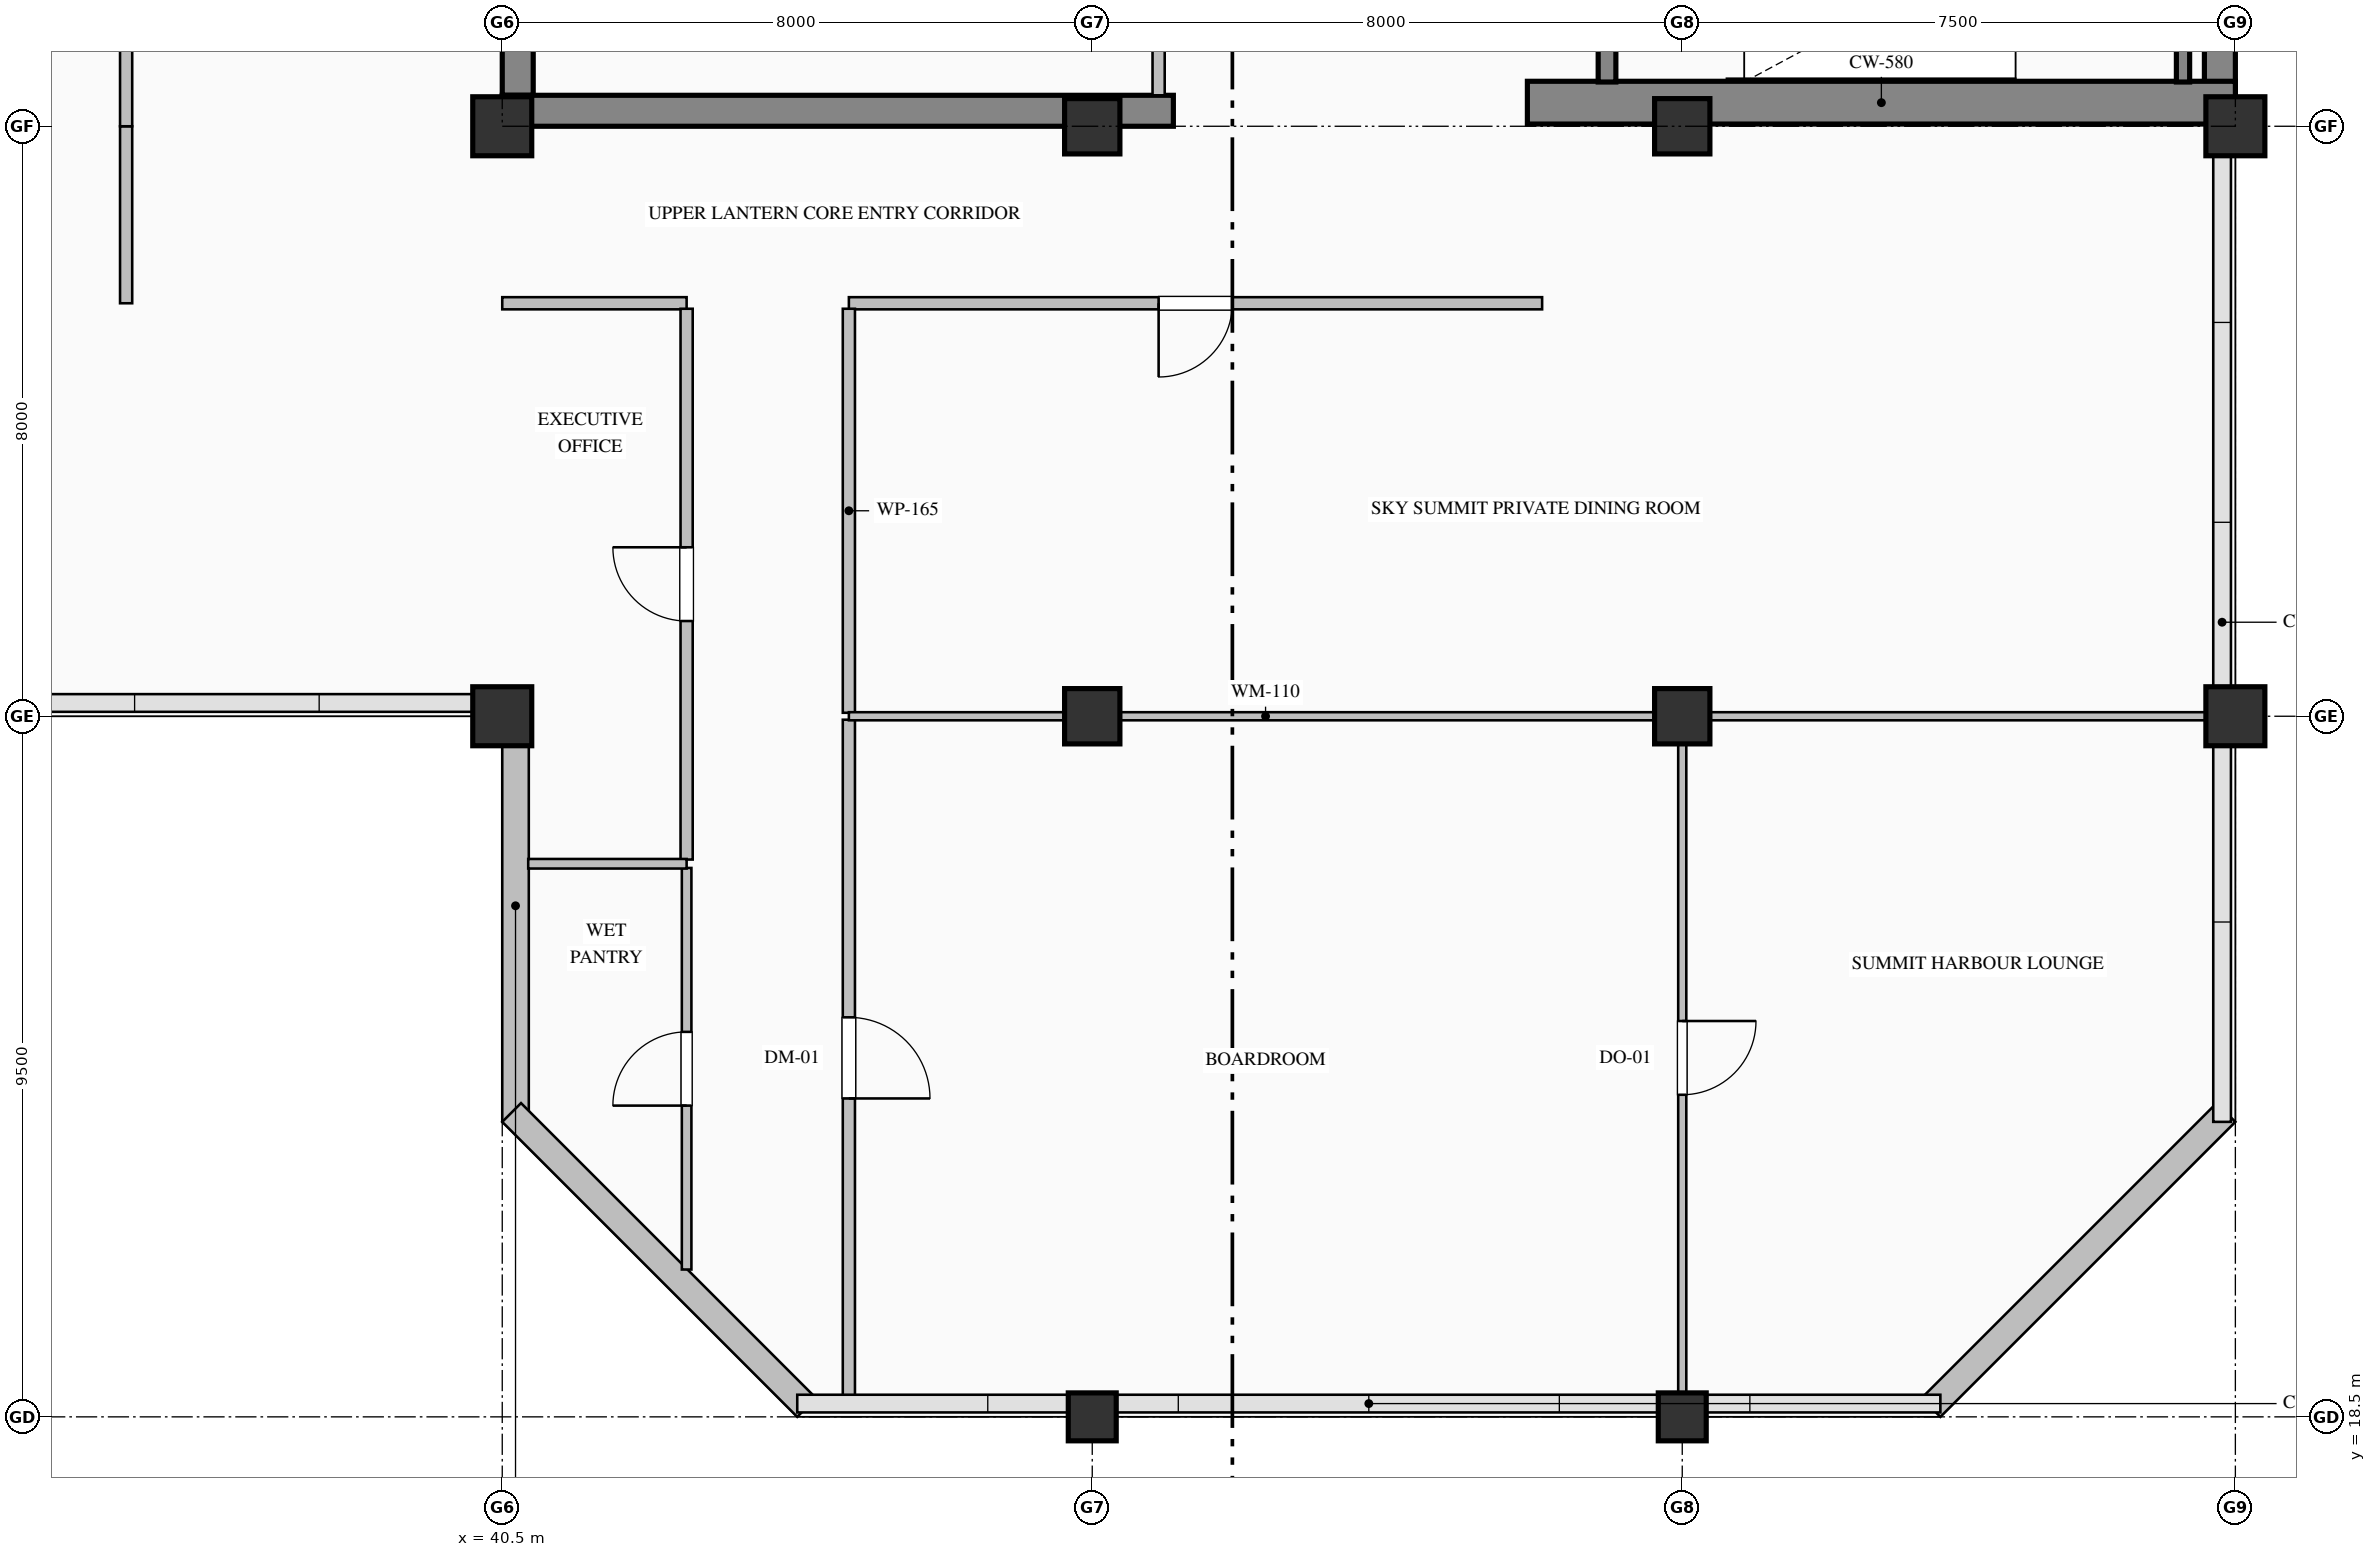
"""IFC4 building model, lengths in metres.
Left out: names, types, materials, properties, quantities, classifications, styles, units other than length and angle.
Written with IfcOpenShell. Run it as: python <this file> out.ifc"""

import sys

from ifc_helpers import new_model, si_unit, direction, frame, frame_2d, origin, origin_2d, place, context, subcontext, project, spatial, rectangle, hollow_rectangle, extrude, element, fill, save


model = new_model("IFC4")
c1 = context("Model", 3, precision=1e-05, world=origin(), true_north=direction((0.0, 1.0)))
c2 = subcontext(c1, "Body", "Model", "MODEL_VIEW")
j1 = project(units=[si_unit("LENGTHUNIT", "METRE"), si_unit("PLANEANGLEUNIT", "RADIAN")], contexts=[c1])
p1 = place(None, origin())
s1 = spatial("IfcSite", under=j1, at=p1, CompositionType="ELEMENT")
p2 = place(p1, origin())
s2 = spatial("IfcBuilding", under=s1, at=p2, CompositionType="ELEMENT")
p3 = place(p2, frame((0.0, 0.0, 378.4)))
s3 = spatial("IfcBuildingStorey", under=s2, at=p3, CompositionType="ELEMENT", Elevation=378.4)
p4 = place(p3, frame((63.79, 36.32, 0.0), z_axis=(0.0, 0.0, 1.0), x_axis=(0.0, 1.0, 0.0)))
e1 = element("IfcWall", 1, at=p4, inside=s3, PredefinedType="SHEAR", context=c2, shape_type="SweptSolid", body=[
    extrude(rectangle(XDim=15.26, YDim=0.42, at=frame_2d((7.63, 0.0))), origin(), (0.0, 0.0, 1.0), 4.95),
])
p5 = place(p3, frame((40.71, 36.42, 0.0), z_axis=(0.0, 0.0, 1.0), x_axis=(0.0, 1.0, 0.0)))
e2 = element("IfcWall", 2, at=p5, inside=s3, PredefinedType="SHEAR", context=c2, shape_type="SweptSolid", body=[
    extrude(rectangle(XDim=7.98, YDim=0.42, at=frame_2d((3.99, 0.0))), origin(), (0.0, 0.0, 1.0), 4.95),
])
p6 = place(p3, frame((40.5, 36.21, 0.0), z_axis=(0.0, 0.0, 1.0), x_axis=(1.0, 0.0, 0.0)))
e3 = element("IfcWall", 3, at=p6, inside=s3, PredefinedType="SHEAR", context=c2, shape_type="SweptSolid", body=[
    extrude(rectangle(XDim=9.1, YDim=0.42, at=frame_2d((4.55, 0.0))), origin(), (0.0, 0.0, 1.0), 4.95),
])
p7 = place(p3, frame((54.4, 36.32, 0.0), z_axis=(0.0, 0.0, 1.0), x_axis=(1.0, 0.0, 0.0)))
e4 = element("IfcWall", 4, at=p7, inside=s3, PredefinedType="SHEAR", context=c2, shape_type="SweptSolid", body=[
    extrude(rectangle(XDim=9.6, YDim=0.58, at=frame_2d((4.8, 0.0))), origin(), (0.0, 0.0, 1.0), 5.4),
])
for number, where, z_axis, x_axis in (
    (5, (40.5, 28.0, 0.0), (0.0, 0.0, 1.0), (1.0, 0.0, 0.0)),
    (6, (40.5, 36.0, 0.0), (0.0, 0.0, 1.0), (1.0, 0.0, 0.0)),
):
    element("IfcColumn", number, at=place(p3, frame(where, z_axis=z_axis, x_axis=x_axis)), inside=s3, PredefinedType="COLUMN", context=c2, shape_type="SweptSolid", body=[
        extrude(hollow_rectangle(XDim=0.8, YDim=0.8, WallThickness=0.032, at=origin_2d()), origin(), (0.0, 0.0, 1.0), 5.4),
    ])
p8 = place(p3, frame((48.5, 18.5, 0.0), z_axis=(0.0, 0.0, 1.0), x_axis=(1.0, 0.0, 0.0)))
e7 = element("IfcColumn", 7, at=p8, inside=s3, PredefinedType="COLUMN", context=c2, shape_type="SweptSolid", body=[
    extrude(hollow_rectangle(XDim=0.65, YDim=0.65, WallThickness=0.028, at=origin_2d()), origin(), (0.0, 0.0, 1.0), 5.4),
])
for number, where, z_axis, x_axis in (
    (8, (48.5, 28.0, 0.0), (0.0, 0.0, 1.0), (1.0, 0.0, 0.0)),
    (9, (48.5, 36.0, 0.0), (0.0, 0.0, 1.0), (1.0, 0.0, 0.0)),
):
    element("IfcColumn", number, at=place(p3, frame(where, z_axis=z_axis, x_axis=x_axis)), inside=s3, PredefinedType="COLUMN", context=c2, shape_type="SweptSolid", body=[
        extrude(rectangle(XDim=0.75, YDim=0.75, at=origin_2d()), origin(), (0.0, 0.0, 1.0), 5.4),
    ])
p9 = place(p3, frame((56.5, 18.5, 0.0), z_axis=(0.0, 0.0, 1.0), x_axis=(1.0, 0.0, 0.0)))
e10 = element("IfcColumn", 10, at=p9, inside=s3, PredefinedType="COLUMN", context=c2, shape_type="SweptSolid", body=[
    extrude(hollow_rectangle(XDim=0.65, YDim=0.65, WallThickness=0.028, at=origin_2d()), origin(), (0.0, 0.0, 1.0), 5.4),
])
for number, where, z_axis, x_axis in (
    (11, (56.5, 28.0, 0.0), (0.0, 0.0, 1.0), (1.0, 0.0, 0.0)),
    (12, (56.5, 36.0, 0.0), (0.0, 0.0, 1.0), (1.0, 0.0, 0.0)),
):
    element("IfcColumn", number, at=place(p3, frame(where, z_axis=z_axis, x_axis=x_axis)), inside=s3, PredefinedType="COLUMN", context=c2, shape_type="SweptSolid", body=[
        extrude(rectangle(XDim=0.75, YDim=0.75, at=origin_2d()), origin(), (0.0, 0.0, 1.0), 5.4),
    ])
for number, where, z_axis, x_axis in (
    (13, (64.0, 28.0, 0.0), (0.0, 0.0, 1.0), (1.0, 0.0, 0.0)),
    (14, (64.0, 36.0, 0.0), (0.0, 0.0, 1.0), (1.0, 0.0, 0.0)),
):
    element("IfcColumn", number, at=place(p3, frame(where, z_axis=z_axis, x_axis=x_axis)), inside=s3, PredefinedType="COLUMN", context=c2, shape_type="SweptSolid", body=[
        extrude(hollow_rectangle(XDim=0.8, YDim=0.8, WallThickness=0.032, at=origin_2d()), origin(), (0.0, 0.0, 1.0), 5.4),
    ])
p10 = place(p3, frame((40.68, 22.5, 0.0), z_axis=(0.0, 0.0, 1.0), x_axis=(0.0, 1.0, 0.0)))
e15 = element("IfcWall", 15, at=p10, inside=s3, PredefinedType="SOLIDWALL", context=c2, shape_type="SweptSolid", body=[
    extrude(rectangle(XDim=5.86, YDim=0.36, at=frame_2d((2.93, 0.0))), origin(), (0.0, 0.0, 1.0), 4.35),
])
for number, where, z_axis, x_axis in (
    (16, (63.873, 22.627, 0.0), (0.0, 0.0, 1.0), (-0.707, -0.707, 0.0)),
    (17, (44.627, 18.627, 0.0), (0.0, 0.0, 1.0), (-0.707, 0.707, 0.0)),
):
    element("IfcWall", number, at=place(p3, frame(where, z_axis=z_axis, x_axis=x_axis)), inside=s3, PredefinedType="SOLIDWALL", context=c2, shape_type="SweptSolid", body=[
        extrude(rectangle(XDim=5.657, YDim=0.36, at=frame_2d((2.828, 0.0))), origin(), (0.0, 0.0, 1.0), 4.95),
    ])
p11 = place(p3, frame((55.48, 39.75, 0.0), z_axis=(0.0, 0.0, 1.0), x_axis=(0.0, -1.0, 0.0)))
e18 = element("IfcWall", 18, at=p11, inside=s3, PredefinedType="SOLIDWALL", context=c2, shape_type="SweptSolid", body=[
    extrude(rectangle(XDim=3.15, YDim=0.24, at=frame_2d((1.575, 0.0))), origin(), (0.0, 0.0, 1.0), 5.4),
])
p12 = place(p11, frame((1.0, 0.0, 0.0)))
e19 = element("IfcOpeningElement", 19, at=p12, cuts=e18, PredefinedType="OPENING", context=c2, shape_type="SweptSolid", body=[
    extrude(rectangle(XDim=1.15, YDim=2.2, at=frame_2d((0.575, 1.1))), frame((0.0, 0.13, 0.0), z_axis=(0.0, -1.0, 0.0), x_axis=(1.0, 0.0, 0.0)), (0.0, 0.0, 1.0), 0.26),
])
p13 = place(p3, frame((63.29, 36.6, 0.0), z_axis=(0.0, 0.0, 1.0), x_axis=(0.0, 1.0, 0.0)))
e20 = element("IfcWall", 20, at=p13, inside=s3, PredefinedType="SOLIDWALL", context=c2, shape_type="SweptSolid", body=[
    extrude(rectangle(XDim=3.15, YDim=0.18, at=frame_2d((1.575, 0.0))), origin(), (0.0, 0.0, 1.0), 5.4),
])
p14 = place(p3, frame((49.4, 36.42, 0.0), z_axis=(0.0, 0.0, 1.0), x_axis=(0.0, 1.0, 0.0)))
e21 = element("IfcWall", 21, at=p14, inside=s3, PredefinedType="PARTITIONING", context=c2, shape_type="SweptSolid", body=[
    extrude(rectangle(XDim=7.73, YDim=0.165, at=frame_2d((3.865, 0.0))), origin(), (0.0, 0.0, 1.0), 4.192),
])
p15 = place(p14, frame((3.365, 0.0, 0.0)))
e22 = element("IfcOpeningElement", 22, at=p15, cuts=e21, PredefinedType="OPENING", context=c2, shape_type="SweptSolid", body=[
    extrude(rectangle(XDim=1.0, YDim=2.15, at=frame_2d((0.5, 1.075))), frame((0.0, 0.093, 0.0), z_axis=(0.0, -1.0, 0.0), x_axis=(1.0, 0.0, 0.0)), (0.0, 0.0, 1.0), 0.185),
])
p16 = place(p3, frame((35.4, 33.6, 0.0), z_axis=(0.0, 0.0, 1.0), x_axis=(0.0, 1.0, 0.0)))
e23 = element("IfcWall", 23, at=p16, inside=s3, PredefinedType="PARTITIONING", context=c2, shape_type="SweptSolid", body=[
    extrude(rectangle(XDim=2.4, YDim=0.165, at=frame_2d((1.2, 0.0))), origin(), (0.0, 0.0, 1.0), 4.95),
])
p17 = place(p3, frame((54.6, 33.6, 0.0), z_axis=(0.0, 0.0, 1.0), x_axis=(-1.0, 0.0, 0.0)))
e24 = element("IfcWall", 24, at=p17, inside=s3, PredefinedType="PARTITIONING", context=c2, shape_type="SweptSolid", body=[
    extrude(rectangle(XDim=9.4, YDim=0.165, at=frame_2d((4.7, 0.0))), origin(), (0.0, 0.0, 1.0), 4.95),
])
p18 = place(p17, frame((4.2, 0.0, 0.0)))
e25 = element("IfcOpeningElement", 25, at=p18, cuts=e24, PredefinedType="OPENING", context=c2, shape_type="SweptSolid", body=[
    extrude(rectangle(XDim=1.0, YDim=2.15, at=frame_2d((0.5, 1.075))), frame((0.0, 0.093, 0.0), z_axis=(0.0, -1.0, 0.0), x_axis=(1.0, 0.0, 0.0)), (0.0, 0.0, 1.0), 0.185),
])
p19 = place(p3, frame((43.0, 33.6, 0.0), z_axis=(0.0, 0.0, 1.0), x_axis=(-1.0, 0.0, 0.0)))
e26 = element("IfcWall", 26, at=p19, inside=s3, PredefinedType="PARTITIONING", context=c2, shape_type="SweptSolid", body=[
    extrude(rectangle(XDim=2.5, YDim=0.165, at=frame_2d((1.25, 0.0))), origin(), (0.0, 0.0, 1.0), 4.95),
])
p20 = place(p3, frame((35.4, 36.0, 0.0), z_axis=(0.0, 0.0, 1.0), x_axis=(0.0, 1.0, 0.0)))
e27 = element("IfcWall", 27, at=p20, inside=s3, PredefinedType="PARTITIONING", context=c2, shape_type="SweptSolid", body=[
    extrude(rectangle(XDim=11.343, YDim=0.165, at=frame_2d((5.671, 0.0))), origin(), (0.0, 0.0, 1.0), 4.95),
])
p21 = place(p20, frame((4.671, 0.0, 0.0)))
e28 = element("IfcOpeningElement", 28, at=p21, cuts=e27, PredefinedType="OPENING", context=c2, shape_type="SweptSolid", body=[
    extrude(rectangle(XDim=2.0, YDim=2.4, at=frame_2d((1.0, 1.2))), frame((0.0, 0.093, 0.0), z_axis=(0.0, -1.0, 0.0), x_axis=(1.0, 0.0, 0.0)), (0.0, 0.0, 1.0), 0.185),
])
p22 = place(p3, frame((45.2, 27.953, 0.0), z_axis=(0.0, 0.0, 1.0), x_axis=(0.0, -1.0, 0.0)))
e29 = element("IfcWall", 29, at=p22, inside=s3, PredefinedType="PARTITIONING", context=c2, shape_type="SweptSolid", body=[
    extrude(rectangle(XDim=9.171, YDim=0.165, at=frame_2d((4.585, 0.0))), origin(), (0.0, 0.0, 1.0), 4.95),
])
p23 = place(p22, frame((4.035, 0.0, 0.0)))
e30 = element("IfcOpeningElement", 30, at=p23, cuts=e29, PredefinedType="OPENING", context=c2, shape_type="SweptSolid", body=[
    extrude(rectangle(XDim=1.1, YDim=2.2, at=frame_2d((0.55, 1.1))), frame((0.0, 0.093, 0.0), z_axis=(0.0, -1.0, 0.0), x_axis=(1.0, 0.0, 0.0)), (0.0, 0.0, 1.0), 0.185),
])
p24 = place(p3, frame((45.2, 33.525, 0.0), z_axis=(0.0, 0.0, 1.0), x_axis=(0.0, -1.0, 0.0)))
e31 = element("IfcWall", 31, at=p24, inside=s3, PredefinedType="PARTITIONING", context=c2, shape_type="SweptSolid", body=[
    extrude(rectangle(XDim=5.478, YDim=0.165, at=frame_2d((2.739, 0.0))), origin(), (0.0, 0.0, 1.0), 4.95),
])
p25 = place(p3, frame((43.0, 20.498, 0.0), z_axis=(0.0, 0.0, 1.0), x_axis=(0.0, 1.0, 0.0)))
e32 = element("IfcWall", 32, at=p25, inside=s3, PredefinedType="PARTITIONING", context=c2, shape_type="SweptSolid", body=[
    extrude(rectangle(XDim=5.445, YDim=0.13, at=frame_2d((2.723, 0.0))), origin(), (0.0, 0.0, 1.0), 4.95),
])
p26 = place(p25, frame((2.223, 0.0, 0.0)))
e33 = element("IfcOpeningElement", 33, at=p26, cuts=e32, PredefinedType="OPENING", context=c2, shape_type="SweptSolid", body=[
    extrude(rectangle(XDim=1.0, YDim=2.15, at=frame_2d((0.5, 1.075))), frame((0.0, 0.075, 0.0), z_axis=(0.0, -1.0, 0.0), x_axis=(1.0, 0.0, 0.0)), (0.0, 0.0, 1.0), 0.15),
])
p27 = place(p3, frame((43.0, 26.057, 0.0), z_axis=(0.0, 0.0, 1.0), x_axis=(0.0, 1.0, 0.0)))
e34 = element("IfcWall", 34, at=p27, inside=s3, PredefinedType="PARTITIONING", context=c2, shape_type="SweptSolid", body=[
    extrude(rectangle(XDim=7.469, YDim=0.165, at=frame_2d((3.734, 0.0))), origin(), (0.0, 0.0, 1.0), 4.95),
])
p28 = place(p27, frame((3.234, 0.0, 0.0)))
e35 = element("IfcOpeningElement", 35, at=p28, cuts=e34, PredefinedType="OPENING", context=c2, shape_type="SweptSolid", body=[
    extrude(rectangle(XDim=1.0, YDim=2.15, at=frame_2d((0.5, 1.075))), frame((0.0, 0.093, 0.0), z_axis=(0.0, -1.0, 0.0), x_axis=(1.0, 0.0, 0.0)), (0.0, 0.0, 1.0), 0.185),
])
p29 = place(p3, frame((56.5, 27.953, 0.0), z_axis=(0.0, 0.0, 1.0), x_axis=(0.0, -1.0, 0.0)))
e36 = element("IfcWall", 36, at=p29, inside=s3, PredefinedType="MOVABLE", context=c2, shape_type="SweptSolid", body=[
    extrude(rectangle(XDim=9.171, YDim=0.11, at=frame_2d((4.585, 0.0))), origin(), (0.0, 0.0, 1.0), 4.142),
])
p30 = place(p29, frame((4.085, 0.0, 0.0)))
e37 = element("IfcOpeningElement", 37, at=p30, cuts=e36, PredefinedType="OPENING", context=c2, shape_type="SweptSolid", body=[
    extrude(rectangle(XDim=1.0, YDim=2.15, at=frame_2d((0.5, 1.075))), frame((0.0, 0.065, 0.0), z_axis=(0.0, -1.0, 0.0), x_axis=(1.0, 0.0, 0.0)), (0.0, 0.0, 1.0), 0.13),
])
p31 = place(p3, frame((45.2, 28.0, 0.0), z_axis=(0.0, 0.0, 1.0), x_axis=(1.0, 0.0, 0.0)))
e38 = element("IfcWall", 38, at=p31, inside=s3, PredefinedType="MOVABLE", context=c2, shape_type="SweptSolid", body=[
    extrude(rectangle(XDim=11.3, YDim=0.11, at=frame_2d((5.65, 0.0))), origin(), (0.0, 0.0, 1.0), 4.342),
])
p32 = place(p3, frame((56.5, 28.0, 0.0), z_axis=(0.0, 0.0, 1.0), x_axis=(1.0, 0.0, 0.0)))
e39 = element("IfcWall", 39, at=p32, inside=s3, PredefinedType="MOVABLE", context=c2, shape_type="SweptSolid", body=[
    extrude(rectangle(XDim=7.218, YDim=0.11, at=frame_2d((3.609, 0.0))), origin(), (0.0, 0.0, 1.0), 4.342),
])
p33 = place(p3, frame((40.852, 26.0, 0.0), z_axis=(0.0, 0.0, 1.0), x_axis=(1.0, 0.0, 0.0)))
e40 = element("IfcWall", 40, at=p33, inside=s3, PredefinedType="PARTITIONING", context=c2, shape_type="SweptSolid", body=[
    extrude(rectangle(XDim=2.148, YDim=0.13, at=frame_2d((1.074, 0.0))), origin(), (0.0, 0.0, 1.0), 4.95),
])
p34 = place(p23, origin())
e41 = element("IfcDoor", 41, at=p34, inside=s3, OperationType="SINGLE_SWING_RIGHT", PredefinedType="DOOR", context=c2, shape_type="SweptSolid", body=[
    extrude(rectangle(XDim=1.1, YDim=2.2, at=frame_2d((0.55, 1.1))), frame((0.0, 0.025, 0.0), z_axis=(0.0, -1.0, 0.0), x_axis=(1.0, 0.0, 0.0)), (0.0, 0.0, 1.0), 0.05),
])
fill(e30, e41)
p35 = place(p30, origin())
e42 = element("IfcDoor", 42, at=p35, inside=s3, OperationType="SINGLE_SWING_LEFT", PredefinedType="DOOR", context=c2, shape_type="SweptSolid", body=[
    extrude(rectangle(XDim=1.0, YDim=2.15, at=frame_2d((0.5, 1.075))), frame((0.0, 0.025, 0.0), z_axis=(0.0, -1.0, 0.0), x_axis=(1.0, 0.0, 0.0)), (0.0, 0.0, 1.0), 0.05),
])
fill(e37, e42)
p36 = place(p18, origin())
e43 = element("IfcDoor", 43, at=p36, inside=s3, OperationType="SINGLE_SWING_RIGHT", PredefinedType="DOOR", context=c2, shape_type="SweptSolid", body=[
    extrude(rectangle(XDim=1.0, YDim=2.15, at=frame_2d((0.5, 1.075))), frame((0.0, 0.025, 0.0), z_axis=(0.0, -1.0, 0.0), x_axis=(1.0, 0.0, 0.0)), (0.0, 0.0, 1.0), 0.05),
])
fill(e25, e43)
p37 = place(p26, origin())
e44 = element("IfcDoor", 44, at=p37, inside=s3, OperationType="SINGLE_SWING_LEFT", PredefinedType="DOOR", context=c2, shape_type="SweptSolid", body=[
    extrude(rectangle(XDim=1.0, YDim=2.15, at=frame_2d((0.5, 1.075))), frame((0.0, 0.025, 0.0), z_axis=(0.0, -1.0, 0.0), x_axis=(1.0, 0.0, 0.0)), (0.0, 0.0, 1.0), 0.05),
])
fill(e33, e44)
p38 = place(p28, origin())
e45 = element("IfcDoor", 45, at=p38, inside=s3, OperationType="SINGLE_SWING_RIGHT", PredefinedType="DOOR", context=c2, shape_type="SweptSolid", body=[
    extrude(rectangle(XDim=1.0, YDim=2.15, at=frame_2d((0.5, 1.075))), frame((0.0, 0.025, 0.0), z_axis=(0.0, -1.0, 0.0), x_axis=(1.0, 0.0, 0.0)), (0.0, 0.0, 1.0), 0.05),
])
fill(e35, e45)
save(model, sys.argv[1])
